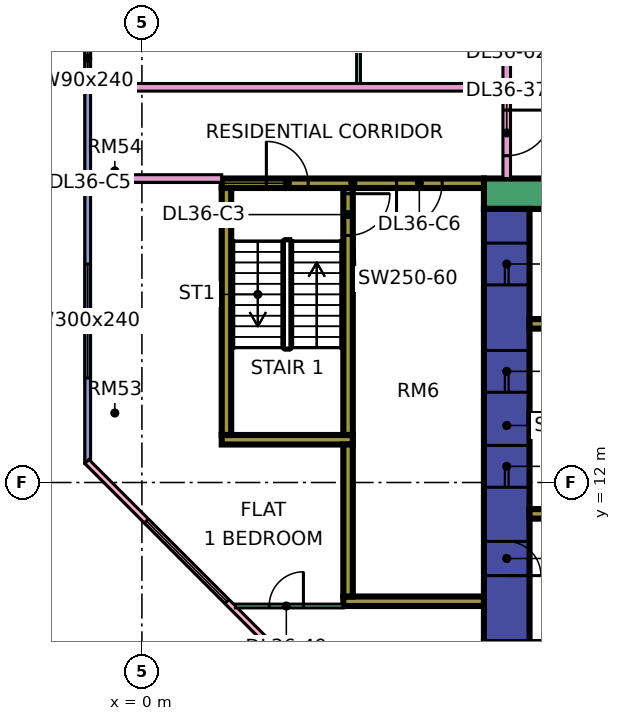
"""IFC4 building model, lengths in metres.
Left out: names, types, materials, properties, quantities, classifications, styles, units other than length and angle.
Written with IfcOpenShell. Run it as: python <this file> out.ifc"""

import sys

from ifc_helpers import new_model, si_unit, direction, frame, frame_2d, origin, place, context, subcontext, project, spatial, rectangle, extrude, element, fill, save


model = new_model("IFC4")
c1 = context("Model", 3, precision=1e-05, world=origin(), true_north=direction((0.0, 1.0)))
c2 = subcontext(c1, "Body", "Model", "MODEL_VIEW")
j1 = project(units=[si_unit("LENGTHUNIT", "METRE"), si_unit("PLANEANGLEUNIT", "RADIAN")], contexts=[c1])
p1 = place(None, origin())
s1 = spatial("IfcSite", under=j1, at=p1, CompositionType="ELEMENT")
p2 = place(p1, origin())
s2 = spatial("IfcBuilding", under=s1, at=p2, CompositionType="ELEMENT")
p3 = place(p2, frame((0.0, 0.0, 161.15)))
s3 = spatial("IfcBuildingStorey", under=s2, at=p3, CompositionType="ELEMENT", Elevation=161.15)
p4 = place(p3, frame((9.0, 19.6, 0.0), z_axis=(0.0, 0.0, 1.0), x_axis=(1.0, 0.0, 0.0)))
e1 = element("IfcWall", 1, at=p4, inside=s3, PredefinedType="SHEAR", context=c2, shape_type="SweptSolid", body=[
    extrude(rectangle(XDim=25.0, YDim=0.8, at=frame_2d((12.5, 0.0))), origin(), (0.0, 0.0, 1.0), 3.75),
])
p5 = place(p4, frame((19.1, 0.0, 0.0)))
e2 = element("IfcOpeningElement", 2, at=p5, cuts=e1, PredefinedType="OPENING", context=c2, shape_type="SweptSolid", body=[
    extrude(rectangle(XDim=1.8, YDim=2.4, at=frame_2d((0.9, 1.2))), frame((0.0, 0.41, 0.0), z_axis=(0.0, -1.0, 0.0), x_axis=(1.0, 0.0, 0.0)), (0.0, 0.0, 1.0), 0.82),
])
p6 = place(p3, frame((9.6, 7.8, 0.0), z_axis=(0.0, 0.0, 1.0), x_axis=(0.0, 1.0, 0.0)))
e3 = element("IfcWall", 3, at=p6, inside=s3, PredefinedType="SHEAR", context=c2, shape_type="SweptSolid", body=[
    extrude(rectangle(XDim=11.4, YDim=1.2, at=frame_2d((5.7, 0.0))), origin(), (0.0, 0.0, 1.0), 3.75),
])
p7 = place(p6, frame((4.075, 0.0, 0.0)))
e4 = element("IfcOpeningElement", 4, at=p7, cuts=e3, PredefinedType="OPENING", context=c2, shape_type="SweptSolid", body=[
    extrude(rectangle(XDim=1.1, YDim=2.2, at=frame_2d((0.55, 1.1))), frame((0.0, 0.61, 0.0), z_axis=(0.0, -1.0, 0.0), x_axis=(1.0, 0.0, 0.0)), (0.0, 0.0, 1.0), 1.22),
])
p8 = place(p6, frame((6.575, 0.0, 0.0)))
e5 = element("IfcOpeningElement", 5, at=p8, cuts=e3, PredefinedType="OPENING", context=c2, shape_type="SweptSolid", body=[
    extrude(rectangle(XDim=1.1, YDim=2.2, at=frame_2d((0.55, 1.1))), frame((0.0, 0.61, 0.0), z_axis=(0.0, -1.0, 0.0), x_axis=(1.0, 0.0, 0.0)), (0.0, 0.0, 1.0), 1.22),
])
p9 = place(p6, frame((9.4, 0.0, 0.0)))
e6 = element("IfcOpeningElement", 6, at=p9, cuts=e3, PredefinedType="OPENING", context=c2, shape_type="SweptSolid", body=[
    extrude(rectangle(XDim=1.1, YDim=2.2, at=frame_2d((0.55, 1.1))), frame((0.0, 0.61, 0.0), z_axis=(0.0, -1.0, 0.0), x_axis=(1.0, 0.0, 0.0)), (0.0, 0.0, 1.0), 1.22),
])
p10 = place(p6, frame((1.75, 0.0, 0.0)))
e7 = element("IfcOpeningElement", 7, at=p10, cuts=e3, PredefinedType="OPENING", context=c2, shape_type="SweptSolid", body=[
    extrude(rectangle(XDim=0.9, YDim=2.1, at=frame_2d((0.45, 1.05))), frame((0.0, 0.61, 0.0), z_axis=(0.0, -1.0, 0.0), x_axis=(1.0, 0.0, 0.0)), (0.0, 0.0, 1.0), 1.22),
])
for number, where, z_axis, x_axis in (
    (8, (10.2, 11.175, 0.0), (0.0, 0.0, 1.0), (1.0, 0.0, 0.0)),
    (9, (10.2, 13.675, 0.0), (0.0, 0.0, 1.0), (1.0, 0.0, 0.0)),
    (10, (10.2, 16.175, 0.0), (0.0, 0.0, 1.0), (1.0, 0.0, 0.0)),
):
    element("IfcWall", number, at=place(p3, frame(where, z_axis=z_axis, x_axis=x_axis)), inside=s3, PredefinedType="SHEAR", context=c2, shape_type="SweptSolid", body=[
        extrude(rectangle(XDim=3.0, YDim=0.25, at=frame_2d((1.5, 0.0))), origin(), (0.0, 0.0, 1.0), 3.75),
    ])
p11 = place(p3, frame((2.1, 19.875, 0.0), z_axis=(0.0, 0.0, 1.0), x_axis=(1.0, 0.0, 0.0)))
e11 = element("IfcWall", 11, at=p11, inside=s3, PredefinedType="SHEAR", context=c2, shape_type="SweptSolid", body=[
    extrude(rectangle(XDim=6.9, YDim=0.25, at=frame_2d((3.45, 0.0))), origin(), (0.0, 0.0, 1.0), 3.75),
])
p12 = place(p11, frame((1.175, 0.0, 0.0)))
e12 = element("IfcOpeningElement", 12, at=p12, cuts=e11, PredefinedType="OPENING", context=c2, shape_type="SweptSolid", body=[
    extrude(rectangle(XDim=1.1, YDim=2.2, at=frame_2d((0.55, 1.1))), frame((0.0, 0.135, 0.0), z_axis=(0.0, -1.0, 0.0), x_axis=(1.0, 0.0, 0.0)), (0.0, 0.0, 1.0), 0.27),
])
p13 = place(p11, frame((4.6, 0.0, 0.0)))
e13 = element("IfcOpeningElement", 13, at=p13, cuts=e11, PredefinedType="OPENING", context=c2, shape_type="SweptSolid", body=[
    extrude(rectangle(XDim=1.2, YDim=2.2, at=frame_2d((0.6, 1.1))), frame((0.0, 0.135, 0.0), z_axis=(0.0, -1.0, 0.0), x_axis=(1.0, 0.0, 0.0)), (0.0, 0.0, 1.0), 0.27),
])
p14 = place(p3, frame((2.1, 13.125, 0.0), z_axis=(0.0, 0.0, 1.0), x_axis=(1.0, 0.0, 0.0)))
e14 = element("IfcWall", 14, at=p14, inside=s3, PredefinedType="SHEAR", context=c2, shape_type="SweptSolid", body=[
    extrude(rectangle(XDim=3.45, YDim=0.25, at=frame_2d((1.725, 0.0))), origin(), (0.0, 0.0, 1.0), 3.75),
])
p15 = place(p3, frame((2.225, 13.25, 0.0), z_axis=(0.0, 0.0, 1.0), x_axis=(0.0, 1.0, 0.0)))
e15 = element("IfcWall", 15, at=p15, inside=s3, PredefinedType="SHEAR", context=c2, shape_type="SweptSolid", body=[
    extrude(rectangle(XDim=6.5, YDim=0.25, at=frame_2d((3.25, 0.0))), origin(), (0.0, 0.0, 1.0), 3.75),
])
p16 = place(p3, frame((5.425, 13.25, 0.0), z_axis=(0.0, 0.0, 1.0), x_axis=(0.0, 1.0, 0.0)))
e16 = element("IfcWall", 16, at=p16, inside=s3, PredefinedType="SHEAR", context=c2, shape_type="SweptSolid", body=[
    extrude(rectangle(XDim=6.5, YDim=0.25, at=frame_2d((3.25, 0.0))), origin(), (0.0, 0.0, 1.0), 3.75),
])
p17 = place(p16, frame((5.25, 0.0, 0.0)))
e17 = element("IfcOpeningElement", 17, at=p17, cuts=e16, PredefinedType="OPENING", context=c2, shape_type="SweptSolid", body=[
    extrude(rectangle(XDim=1.1, YDim=2.2, at=frame_2d((0.55, 1.1))), frame((0.0, 0.135, 0.0), z_axis=(0.0, -1.0, 0.0), x_axis=(1.0, 0.0, 0.0)), (0.0, 0.0, 1.0), 0.27),
])
p18 = place(p3, frame((5.3, 8.875, 0.0), z_axis=(0.0, 0.0, 1.0), x_axis=(1.0, 0.0, 0.0)))
e18 = element("IfcWall", 18, at=p18, inside=s3, PredefinedType="SHEAR", context=c2, shape_type="SweptSolid", body=[
    extrude(rectangle(XDim=3.7, YDim=0.25, at=frame_2d((1.85, 0.0))), origin(), (0.0, 0.0, 1.0), 3.75),
])
p19 = place(p3, frame((5.425, 9.0, 0.0), z_axis=(0.0, 0.0, 1.0), x_axis=(0.0, 1.0, 0.0)))
e19 = element("IfcWall", 19, at=p19, inside=s3, PredefinedType="SHEAR", context=c2, shape_type="SweptSolid", body=[
    extrude(rectangle(XDim=4.0, YDim=0.25, at=frame_2d((2.0, 0.0))), origin(), (0.0, 0.0, 1.0), 3.75),
])
p20 = place(p3, frame((-1.425, 23.925, 0.0), z_axis=(0.0, 0.0, 1.0), x_axis=(0.0, -1.0, 0.0)))
e20 = element("IfcWall", 20, at=p20, inside=s3, PredefinedType="SOLIDWALL", context=c2, shape_type="SweptSolid", body=[
    extrude(rectangle(XDim=11.425, YDim=0.15, at=frame_2d((5.712, 0.0))), origin(), (0.0, 0.0, 1.0), 3.35),
])
p21 = place(p20, frame((0.312, 0.0, 0.45)))
e21 = element("IfcOpeningElement", 21, at=p21, cuts=e20, PredefinedType="OPENING", context=c2, shape_type="SweptSolid", body=[
    extrude(rectangle(XDim=0.9, YDim=2.4, at=frame_2d((0.45, 1.2))), frame((0.0, 0.085, 0.0), z_axis=(0.0, -1.0, 0.0), x_axis=(1.0, 0.0, 0.0)), (0.0, 0.0, 1.0), 0.17),
])
p22 = place(p20, frame((6.175, 0.0, 0.45)))
e22 = element("IfcOpeningElement", 22, at=p22, cuts=e20, PredefinedType="OPENING", context=c2, shape_type="SweptSolid", body=[
    extrude(rectangle(XDim=3.0, YDim=2.4, at=frame_2d((1.5, 1.2))), frame((0.0, 0.085, 0.0), z_axis=(0.0, -1.0, 0.0), x_axis=(1.0, 0.0, 0.0)), (0.0, 0.0, 1.0), 0.17),
])
p23 = place(p3, frame((-1.447, 12.553, 0.0), z_axis=(0.0, 0.0, 1.0), x_axis=(0.707106781187, -0.707106781187, 0.0)))
e23 = element("IfcWall", 23, at=p23, inside=s3, PredefinedType="SOLIDWALL", context=c2, shape_type="SweptSolid", body=[
    extrude(rectangle(XDim=19.799, YDim=0.15, at=frame_2d((9.899, 0.0))), origin(), (0.0, 0.0, 1.0), 3.35),
])
p24 = place(p23, frame((2.212, 0.0, 0.45)))
e24 = element("IfcOpeningElement", 24, at=p24, cuts=e23, PredefinedType="OPENING", context=c2, shape_type="SweptSolid", body=[
    extrude(rectangle(XDim=3.0, YDim=2.4, at=frame_2d((1.5, 1.2))), frame((0.0, 0.085, 0.0), z_axis=(0.0, -1.0, 0.0), x_axis=(1.0, 0.0, 0.0)), (0.0, 0.0, 1.0), 0.17),
])
p25 = place(p23, frame((10.216, 0.0, 0.45)))
e25 = element("IfcOpeningElement", 25, at=p25, cuts=e23, PredefinedType="OPENING", context=c2, shape_type="SweptSolid", body=[
    extrude(rectangle(XDim=3.0, YDim=2.4, at=frame_2d((1.5, 1.2))), frame((0.0, 0.085, 0.0), z_axis=(0.0, -1.0, 0.0), x_axis=(1.0, 0.0, 0.0)), (0.0, 0.0, 1.0), 0.17),
])
p26 = place(p3, frame((-1.35, 20.0, 0.0), z_axis=(0.0, 0.0, 1.0), x_axis=(1.0, 0.0, 0.0)))
e26 = element("IfcWall", 26, at=p26, inside=s3, PredefinedType="PARTITIONING", context=c2, shape_type="SweptSolid", body=[
    extrude(rectangle(XDim=3.45, YDim=0.2, at=frame_2d((1.725, 0.0))), origin(), (0.0, 0.0, 1.0), 3.35),
])
p27 = place(p3, frame((-1.35, 22.4, 0.0), z_axis=(0.0, 0.0, 1.0), x_axis=(1.0, 0.0, 0.0)))
e27 = element("IfcWall", 27, at=p27, inside=s3, PredefinedType="PARTITIONING", context=c2, shape_type="SweptSolid", body=[
    extrude(rectangle(XDim=10.85, YDim=0.2, at=frame_2d((5.425, 0.0))), origin(), (0.0, 0.0, 1.0), 3.35),
])
p28 = place(p3, frame((2.461, 8.75, 0.0), z_axis=(0.0, 0.0, 1.0), x_axis=(1.0, 0.0, 0.0)))
e28 = element("IfcWall", 28, at=p28, inside=s3, PredefinedType="PARTITIONING", context=c2, shape_type="SweptSolid", body=[
    extrude(rectangle(XDim=2.839, YDim=0.1, at=frame_2d((1.419, 0.0))), origin(), (0.0, 0.0, 1.0), 3.35),
])
p29 = place(p28, frame((0.889, 0.0, 0.0)))
e29 = element("IfcOpeningElement", 29, at=p29, cuts=e28, PredefinedType="OPENING", context=c2, shape_type="SweptSolid", body=[
    extrude(rectangle(XDim=0.9, YDim=2.1, at=frame_2d((0.45, 1.05))), frame((0.0, 0.06, 0.0), z_axis=(0.0, -1.0, 0.0), x_axis=(1.0, 0.0, 0.0)), (0.0, 0.0, 1.0), 0.12),
])
p30 = place(p3, frame((5.7, 22.5, 0.0), z_axis=(0.0, 0.0, 1.0), x_axis=(0.0, 1.0, 0.0)))
e30 = element("IfcWall", 30, at=p30, inside=s3, PredefinedType="PARTITIONING", context=c2, shape_type="SweptSolid", body=[
    extrude(rectangle(XDim=10.55, YDim=0.1, at=frame_2d((5.275, 0.0))), origin(), (0.0, 0.0, 1.0), 3.35),
])
p31 = place(p30, frame((1.8, 0.0, 0.0)))
e31 = element("IfcOpeningElement", 31, at=p31, cuts=e30, PredefinedType="OPENING", context=c2, shape_type="SweptSolid", body=[
    extrude(rectangle(XDim=0.9, YDim=2.1, at=frame_2d((0.45, 1.05))), frame((0.0, 0.06, 0.0), z_axis=(0.0, -1.0, 0.0), x_axis=(1.0, 0.0, 0.0)), (0.0, 0.0, 1.0), 0.12),
])
p32 = place(p30, frame((5.55, 0.0, 0.0)))
e32 = element("IfcOpeningElement", 32, at=p32, cuts=e30, PredefinedType="OPENING", context=c2, shape_type="SweptSolid", body=[
    extrude(rectangle(XDim=0.9, YDim=2.1, at=frame_2d((0.45, 1.05))), frame((0.0, 0.06, 0.0), z_axis=(0.0, -1.0, 0.0), x_axis=(1.0, 0.0, 0.0)), (0.0, 0.0, 1.0), 0.12),
])
p33 = place(p30, frame((8.55, 0.0, 0.0)))
e33 = element("IfcOpeningElement", 33, at=p33, cuts=e30, PredefinedType="OPENING", context=c2, shape_type="SweptSolid", body=[
    extrude(rectangle(XDim=0.9, YDim=2.1, at=frame_2d((0.45, 1.05))), frame((0.0, 0.06, 0.0), z_axis=(0.0, -1.0, 0.0), x_axis=(1.0, 0.0, 0.0)), (0.0, 0.0, 1.0), 0.12),
])
p34 = place(p3, frame((9.6, 20.0, 0.0), z_axis=(0.0, 0.0, 1.0), x_axis=(0.0, 1.0, 0.0)))
e34 = element("IfcWall", 34, at=p34, inside=s3, PredefinedType="PARTITIONING", context=c2, shape_type="SweptSolid", body=[
    extrude(rectangle(XDim=42.926, YDim=0.2, at=frame_2d((21.463, 0.0))), origin(), (0.0, 0.0, 1.0), 3.35),
])
p35 = place(p34, frame((40.8, 0.0, 0.0)))
e35 = element("IfcOpeningElement", 35, at=p35, cuts=e34, PredefinedType="OPENING", context=c2, shape_type="SweptSolid", body=[
    extrude(rectangle(XDim=1.0, YDim=2.1, at=frame_2d((0.5, 1.05))), frame((0.0, 0.11, 0.0), z_axis=(0.0, -1.0, 0.0), x_axis=(1.0, 0.0, 0.0)), (0.0, 0.0, 1.0), 0.22),
])
p36 = place(p34, frame((0.6, 0.0, 0.0)))
e36 = element("IfcOpeningElement", 36, at=p36, cuts=e34, PredefinedType="OPENING", context=c2, shape_type="SweptSolid", body=[
    extrude(rectangle(XDim=1.2, YDim=2.1, at=frame_2d((0.6, 1.05))), frame((0.0, 0.11, 0.0), z_axis=(0.0, -1.0, 0.0), x_axis=(1.0, 0.0, 0.0)), (0.0, 0.0, 1.0), 0.22),
])
p37 = place(p34, frame((3.9, 0.0, 0.0)))
e37 = element("IfcOpeningElement", 37, at=p37, cuts=e34, PredefinedType="OPENING", context=c2, shape_type="SweptSolid", body=[
    extrude(rectangle(XDim=1.0, YDim=2.1, at=frame_2d((0.5, 1.05))), frame((0.0, 0.11, 0.0), z_axis=(0.0, -1.0, 0.0), x_axis=(1.0, 0.0, 0.0)), (0.0, 0.0, 1.0), 0.22),
])
p38 = place(p21, origin())
e38 = element("IfcWindow", 38, at=p38, inside=s3, PartitioningType="SINGLE_PANEL", PredefinedType="WINDOW", context=c2, shape_type="SweptSolid", body=[
    extrude(rectangle(XDim=0.9, YDim=2.4, at=frame_2d((0.45, 1.2))), frame((0.0, 0.03, 0.0), z_axis=(0.0, -1.0, 0.0), x_axis=(1.0, 0.0, 0.0)), (0.0, 0.0, 1.0), 0.06),
])
fill(e21, e38)
p39 = place(p22, origin())
e39 = element("IfcWindow", 39, at=p39, inside=s3, PartitioningType="SINGLE_PANEL", PredefinedType="WINDOW", context=c2, shape_type="SweptSolid", body=[
    extrude(rectangle(XDim=3.0, YDim=2.4, at=frame_2d((1.5, 1.2))), frame((0.0, 0.03, 0.0), z_axis=(0.0, -1.0, 0.0), x_axis=(1.0, 0.0, 0.0)), (0.0, 0.0, 1.0), 0.06),
])
fill(e22, e39)
p40 = place(p24, origin())
e40 = element("IfcWindow", 40, at=p40, inside=s3, PartitioningType="SINGLE_PANEL", PredefinedType="WINDOW", context=c2, shape_type="SweptSolid", body=[
    extrude(rectangle(XDim=3.0, YDim=2.4, at=frame_2d((1.5, 1.2))), frame((0.0, 0.03, 0.0), z_axis=(0.0, -1.0, 0.0), x_axis=(1.0, 0.0, 0.0)), (0.0, 0.0, 1.0), 0.06),
])
fill(e24, e40)
p41 = place(p7, origin())
e41 = element("IfcDoor", 41, at=p41, inside=s3, OperationType="DOUBLE_DOOR_SLIDING", PredefinedType="DOOR", context=c2, shape_type="SweptSolid", body=[
    extrude(rectangle(XDim=1.1, YDim=2.2, at=frame_2d((0.55, 1.1))), frame((0.0, 0.025, 0.0), z_axis=(0.0, -1.0, 0.0), x_axis=(1.0, 0.0, 0.0)), (0.0, 0.0, 1.0), 0.05),
])
fill(e4, e41)
p42 = place(p8, origin())
e42 = element("IfcDoor", 42, at=p42, inside=s3, OperationType="DOUBLE_DOOR_SLIDING", PredefinedType="DOOR", context=c2, shape_type="SweptSolid", body=[
    extrude(rectangle(XDim=1.1, YDim=2.2, at=frame_2d((0.55, 1.1))), frame((0.0, 0.025, 0.0), z_axis=(0.0, -1.0, 0.0), x_axis=(1.0, 0.0, 0.0)), (0.0, 0.0, 1.0), 0.05),
])
fill(e5, e42)
p43 = place(p9, origin())
e43 = element("IfcDoor", 43, at=p43, inside=s3, OperationType="DOUBLE_DOOR_SLIDING", PredefinedType="DOOR", context=c2, shape_type="SweptSolid", body=[
    extrude(rectangle(XDim=1.1, YDim=2.2, at=frame_2d((0.55, 1.1))), frame((0.0, 0.025, 0.0), z_axis=(0.0, -1.0, 0.0), x_axis=(1.0, 0.0, 0.0)), (0.0, 0.0, 1.0), 0.05),
])
fill(e6, e43)
p44 = place(p17, origin())
e44 = element("IfcDoor", 44, at=p44, inside=s3, OperationType="SINGLE_SWING_RIGHT", PredefinedType="DOOR", context=c2, shape_type="SweptSolid", body=[
    extrude(rectangle(XDim=1.1, YDim=2.2, at=frame_2d((0.55, 1.1))), frame((0.0, 0.025, 0.0), z_axis=(0.0, -1.0, 0.0), x_axis=(1.0, 0.0, 0.0)), (0.0, 0.0, 1.0), 0.05),
])
fill(e17, e44)
p45 = place(p10, frame((0.9, 0.0, 0.0), z_axis=(0.0, 0.0, 1.0), x_axis=(-1.0, 0.0, 0.0)))
e45 = element("IfcDoor", 45, at=p45, inside=s3, OperationType="SINGLE_SWING_LEFT", PredefinedType="DOOR", context=c2, shape_type="SweptSolid", body=[
    extrude(rectangle(XDim=0.9, YDim=2.1, at=frame_2d((0.45, 1.05))), frame((0.0, 0.025, 0.0), z_axis=(0.0, -1.0, 0.0), x_axis=(1.0, 0.0, 0.0)), (0.0, 0.0, 1.0), 0.05),
])
fill(e7, e45)
p46 = place(p12, origin())
e46 = element("IfcDoor", 46, at=p46, inside=s3, OperationType="SINGLE_SWING_LEFT", PredefinedType="DOOR", context=c2, shape_type="SweptSolid", body=[
    extrude(rectangle(XDim=1.1, YDim=2.2, at=frame_2d((0.55, 1.1))), frame((0.0, 0.025, 0.0), z_axis=(0.0, -1.0, 0.0), x_axis=(1.0, 0.0, 0.0)), (0.0, 0.0, 1.0), 0.05),
])
fill(e12, e46)
p47 = place(p13, frame((1.2, 0.0, 0.0), z_axis=(0.0, 0.0, 1.0), x_axis=(-1.0, 0.0, 0.0)))
e47 = element("IfcDoor", 47, at=p47, inside=s3, OperationType="SINGLE_SWING_LEFT", PredefinedType="DOOR", context=c2, shape_type="SweptSolid", body=[
    extrude(rectangle(XDim=1.2, YDim=2.2, at=frame_2d((0.6, 1.1))), frame((0.0, 0.025, 0.0), z_axis=(0.0, -1.0, 0.0), x_axis=(1.0, 0.0, 0.0)), (0.0, 0.0, 1.0), 0.05),
])
fill(e13, e47)
p48 = place(p36, origin())
e48 = element("IfcDoor", 48, at=p48, inside=s3, OperationType="SINGLE_SWING_RIGHT", PredefinedType="DOOR", context=c2, shape_type="SweptSolid", body=[
    extrude(rectangle(XDim=1.2, YDim=2.1, at=frame_2d((0.6, 1.05))), frame((0.0, 0.025, 0.0), z_axis=(0.0, -1.0, 0.0), x_axis=(1.0, 0.0, 0.0)), (0.0, 0.0, 1.0), 0.05),
])
fill(e36, e48)
p49 = place(p29, frame((0.9, 0.0, 0.0), z_axis=(0.0, 0.0, 1.0), x_axis=(-1.0, 0.0, 0.0)))
e49 = element("IfcDoor", 49, at=p49, inside=s3, OperationType="SINGLE_SWING_RIGHT", PredefinedType="DOOR", context=c2, shape_type="SweptSolid", body=[
    extrude(rectangle(XDim=0.9, YDim=2.1, at=frame_2d((0.45, 1.05))), frame((0.0, 0.025, 0.0), z_axis=(0.0, -1.0, 0.0), x_axis=(1.0, 0.0, 0.0)), (0.0, 0.0, 1.0), 0.05),
])
fill(e29, e49)
save(model, sys.argv[1])
